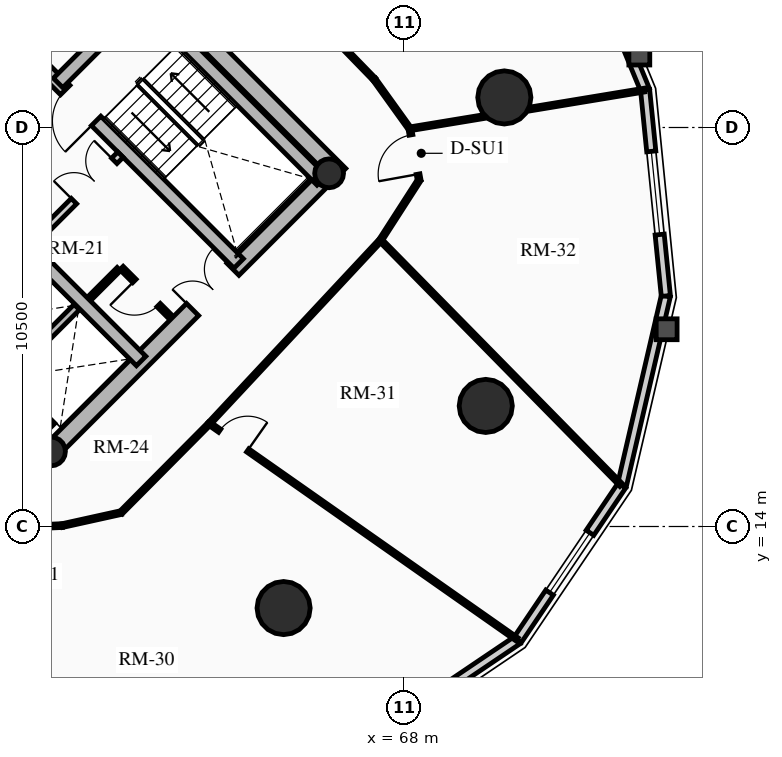
"""IFC4 building model, lengths in metres.
Left out: names, types, materials, properties, quantities, classifications, styles, units other than length and angle.
Written with IfcOpenShell. Run it as: python <this file> out.ifc"""

import sys

from ifc_helpers import new_model, si_unit, direction, frame, frame_2d, origin, origin_2d, place, context, subcontext, project, spatial, rectangle, circle, hollow_circle, extrude, source, transform, mapped, element, fill, save


model = new_model("IFC4")
c1 = context("Model", 3, precision=1e-05, world=origin(), true_north=direction((0.0, 1.0)))
c2 = subcontext(c1, "Body", "Model", "MODEL_VIEW")
j1 = project(units=[si_unit("LENGTHUNIT", "METRE"), si_unit("PLANEANGLEUNIT", "RADIAN")], contexts=[c1])
p1 = place(None, origin())
s1 = spatial("IfcSite", under=j1, at=p1, CompositionType="ELEMENT")
p2 = place(p1, origin())
s2 = spatial("IfcBuilding", under=s1, at=p2, CompositionType="ELEMENT")
p3 = place(p2, frame((0.0, 0.0, 99.25)))
s3 = spatial("IfcBuildingStorey", under=s2, at=p3, CompositionType="ELEMENT", Elevation=99.25)
for number, where, z_axis, x_axis in (
    (1, (58.737, 15.697, 0.0), (0.0, 0.0, 1.0), (-0.707, 0.707, 0.0)),
    (2, (66.303, 23.263, 0.0), (0.0, 0.0, 1.0), (-0.707, 0.707, 0.0)),
):
    element("IfcWall", number, at=place(p3, frame(where, z_axis=z_axis, x_axis=x_axis)), inside=s3, PredefinedType="SHEAR", context=c2, shape_type="SweptSolid", body=[
        extrude(rectangle(XDim=14.2, YDim=0.45, at=frame_2d((7.1, 0.0))), origin(), (0.0, 0.0, 1.0), 2.91),
    ])
p4 = place(p3, frame((58.578, 15.856, 0.0), z_axis=(0.0, 0.0, 1.0), x_axis=(0.707106781187, 0.707106781187, 0.0)))
e3 = element("IfcWall", 3, at=p4, inside=s3, PredefinedType="SHEAR", context=c2, shape_type="SweptSolid", body=[
    extrude(rectangle(XDim=10.7, YDim=0.45, at=frame_2d((5.35, 0.0))), origin(), (0.0, 0.0, 1.0), 2.91),
])
m1 = source(origin(), c2, "Body", "SweptSolid", [
    extrude(rectangle(XDim=1.5, YDim=2.02, at=frame_2d((0.75, 1.01))), frame((0.0, 0.235, 0.0), z_axis=(0.0, -1.0, 0.0), x_axis=(1.0, 0.0, 0.0)), (0.0, 0.0, 1.0), 0.47),
])
p5 = place(p4, frame((5.45, 0.0, 0.0)))
e4 = element("IfcOpeningElement", 4, at=p5, cuts=e3, PredefinedType="OPENING", context=c2, shape_type="MappedRepresentation", body=[
    mapped(m1, transform((0.0, 0.0, 0.0), x_axis=(1.0, 0.0, 0.0), y_axis=(0.0, 1.0, 0.0), z_axis=(0.0, 0.0, 1.0), scale=1.0)),
])
p6 = place(p3, frame((61.078, 18.355, 0.0), z_axis=(0.0, 0.0, 1.0), x_axis=(-0.707106781187, 0.707106781187, 0.0)))
e5 = element("IfcWall", 5, at=p6, inside=s3, PredefinedType="SHEAR", context=c2, shape_type="SweptSolid", body=[
    extrude(rectangle(XDim=13.75, YDim=0.35, at=frame_2d((6.875, 0.0))), origin(), (0.0, 0.0, 1.0), 2.91),
])
m2 = source(origin(), c2, "Body", "SweptSolid", [
    extrude(rectangle(XDim=1.1, YDim=2.015, at=frame_2d((0.55, 1.007))), frame((0.0, 0.185, 0.0), z_axis=(0.0, -1.0, 0.0), x_axis=(1.0, 0.0, 0.0)), (0.0, 0.0, 1.0), 0.37),
])
p7 = place(p6, frame((4.875, 0.0, 0.0)))
e6 = element("IfcOpeningElement", 6, at=p7, cuts=e5, PredefinedType="OPENING", context=c2, shape_type="MappedRepresentation", body=[
    mapped(m2, transform((0.0, 0.0, 0.0), x_axis=(1.0, 0.0, 0.0), y_axis=(0.0, 1.0, 0.0), z_axis=(0.0, 0.0, 1.0), scale=1.0)),
])
m3 = source(origin(), c2, "Body", "SweptSolid", [
    extrude(rectangle(XDim=1.15, YDim=2.02, at=frame_2d((0.575, 1.01))), frame((0.0, 0.185, 0.0), z_axis=(0.0, -1.0, 0.0), x_axis=(1.0, 0.0, 0.0)), (0.0, 0.0, 1.0), 0.37),
])
p8 = place(p6, frame((7.295, 0.0, 0.0)))
e7 = element("IfcOpeningElement", 7, at=p8, cuts=e5, PredefinedType="OPENING", context=c2, shape_type="MappedRepresentation", body=[
    mapped(m3, transform((0.0, 0.0, 0.0), x_axis=(1.0, 0.0, 0.0), y_axis=(0.0, 1.0, 0.0), z_axis=(0.0, 0.0, 1.0), scale=1.0)),
])
p9 = place(p3, frame((63.645, 20.922, 0.0), z_axis=(0.0, 0.0, 1.0), x_axis=(-0.707106781187, 0.707106781187, 0.0)))
e8 = element("IfcWall", 8, at=p9, inside=s3, PredefinedType="SHEAR", context=c2, shape_type="SweptSolid", body=[
    extrude(rectangle(XDim=13.75, YDim=0.35, at=frame_2d((6.875, 0.0))), origin(), (0.0, 0.0, 1.0), 2.91),
])
p10 = place(p9, frame((10.0, 0.0, 0.0)))
e9 = element("IfcOpeningElement", 9, at=p10, cuts=e8, PredefinedType="OPENING", context=c2, shape_type="MappedRepresentation", body=[
    mapped(m2, transform((0.0, 0.0, 0.0), x_axis=(1.0, 0.0, 0.0), y_axis=(0.0, 1.0, 0.0), z_axis=(0.0, 0.0, 1.0), scale=1.0)),
])
p11 = place(p9, frame((12.0, 0.0, 0.0)))
e10 = element("IfcOpeningElement", 10, at=p11, cuts=e8, PredefinedType="OPENING", context=c2, shape_type="MappedRepresentation", body=[
    mapped(m2, transform((0.0, 0.0, 0.0), x_axis=(1.0, 0.0, 0.0), y_axis=(0.0, 1.0, 0.0), z_axis=(0.0, 0.0, 1.0), scale=1.0)),
])
p12 = place(p9, frame((5.305, 0.0, 0.0)))
e11 = element("IfcOpeningElement", 11, at=p12, cuts=e8, PredefinedType="OPENING", context=c2, shape_type="MappedRepresentation", body=[
    mapped(m3, transform((0.0, 0.0, 0.0), x_axis=(1.0, 0.0, 0.0), y_axis=(0.0, 1.0, 0.0), z_axis=(0.0, 0.0, 1.0), scale=1.0)),
])
p13 = place(p3, frame((65.83, 23.107, 0.0), z_axis=(0.0, 0.0, 1.0), x_axis=(-0.707088616009, 0.707124945897, 0.0)))
e12 = element("IfcWall", 12, at=p13, inside=s3, PredefinedType="SHEAR", context=c2, shape_type="SweptSolid", body=[
    extrude(rectangle(XDim=6.72, YDim=0.35, at=frame_2d((3.36, 0.0))), origin(), (0.0, 0.0, 1.0), 2.91),
])
p14 = place(p3, frame((58.893, 25.674, 0.0), z_axis=(0.0, 0.0, 1.0), x_axis=(0.707106781187, 0.707106781187, 0.0)))
e13 = element("IfcWall", 13, at=p14, inside=s3, PredefinedType="SHEAR", context=c2, shape_type="SweptSolid", body=[
    extrude(rectangle(XDim=3.285, YDim=0.35, at=frame_2d((1.643, 0.0))), origin(), (0.0, 0.0, 1.0), 2.91),
])
for number, where, z_axis, x_axis in (
    (14, (58.706, 15.976, 0.0), (0.0, 0.0, 1.0), (0.707, 0.707, 0.0)),
    (15, (66.024, 23.294, 0.0), (0.0, 0.0, 1.0), (0.707, 0.707, 0.0)),
):
    element("IfcColumn", number, at=place(p3, frame(where, z_axis=z_axis, x_axis=x_axis)), inside=s3, PredefinedType="COLUMN", context=c2, shape_type="SweptSolid", body=[
        extrude(hollow_circle(Radius=0.38, WallThickness=0.032, at=origin_2d()), origin(), (0.0, 0.0, 1.0), 2.91),
    ])
for number, where, z_axis, x_axis in (
    (16, (64.827, 11.854, 0.0), (0.0, 0.0, 1.0), (1.0, 0.0, 0.0)),
    (17, (70.146, 17.173, 0.0), (0.0, 0.0, 1.0), (1.0, 0.0, 0.0)),
    (18, (70.635, 25.291, 0.0), (0.0, 0.0, 1.0), (1.0, 0.0, 0.0)),
):
    element("IfcColumn", number, at=place(p3, frame(where, z_axis=z_axis, x_axis=x_axis)), inside=s3, PredefinedType="USERDEFINED", context=c2, shape_type="SweptSolid", body=[
        extrude(circle(Radius=0.7, at=origin_2d()), origin(), (0.0, 0.0, 1.0), 2.91),
    ])
p15 = place(p3, frame((70.985, 11.015, 0.0), z_axis=(0.0, 0.0, 1.0), x_axis=(-0.828781148131, -0.559572880421, 0.0)))
e19 = element("IfcWall", 19, at=p15, inside=s3, PredefinedType="SOLIDWALL", context=c2, shape_type="SweptSolid", body=[
    extrude(rectangle(XDim=4.905, YDim=0.24, at=frame_2d((2.452, 0.0))), origin(), (0.0, 0.0, 1.0), 2.179),
])
p16 = place(p3, frame((73.729, 15.08, 0.0), z_axis=(0.0, 0.0, 1.0), x_axis=(-0.559572880421, -0.828781148131, 0.0)))
e20 = element("IfcWall", 20, at=p16, inside=s3, PredefinedType="SOLIDWALL", context=c2, shape_type="SweptSolid", body=[
    extrude(rectangle(XDim=4.905, YDim=0.24, at=frame_2d((2.452, 0.0))), origin(), (0.0, 0.0, 1.0), 2.179),
])
m4 = source(origin(), c2, "Body", "SweptSolid", [
    extrude(rectangle(XDim=1.9, YDim=1.35, at=frame_2d((0.95, 0.675))), frame((0.0, 0.13, 0.0), z_axis=(0.0, -1.0, 0.0), x_axis=(1.0, 0.0, 0.0)), (0.0, 0.0, 1.0), 0.26),
])
p17 = place(p16, frame((1.502, 0.0, 0.65)))
e21 = element("IfcOpeningElement", 21, at=p17, cuts=e20, PredefinedType="OPENING", context=c2, shape_type="MappedRepresentation", body=[
    mapped(m4, transform((0.0, 0.0, 0.0), x_axis=(1.0, 0.0, 0.0), y_axis=(0.0, 1.0, 0.0), z_axis=(0.0, 0.0, 1.0), scale=1.0)),
])
p18 = place(p3, frame((74.885, 20.067, 0.0), z_axis=(0.0, 0.0, 1.0), x_axis=(-0.225834725257, -0.974165631126, 0.0)))
e22 = element("IfcWall", 22, at=p18, inside=s3, PredefinedType="SOLIDWALL", context=c2, shape_type="SweptSolid", body=[
    extrude(rectangle(XDim=5.119, YDim=0.24, at=frame_2d((2.56, 0.0))), origin(), (0.0, 0.0, 1.0), 2.179),
])
p19 = place(p3, frame((74.339, 25.487, 0.0), z_axis=(0.0, 0.0, 1.0), x_axis=(0.10015591906, -0.994971754311, 0.0)))
e23 = element("IfcWall", 23, at=p19, inside=s3, PredefinedType="SOLIDWALL", context=c2, shape_type="SweptSolid", body=[
    extrude(rectangle(XDim=5.448, YDim=0.24, at=frame_2d((2.724, 0.0))), origin(), (0.0, 0.0, 1.0), 2.179),
])
m5 = source(origin(), c2, "Body", "SweptSolid", [
    extrude(rectangle(XDim=2.2, YDim=1.35, at=frame_2d((1.1, 0.675))), frame((0.0, 0.13, 0.0), z_axis=(0.0, -1.0, 0.0), x_axis=(1.0, 0.0, 0.0)), (0.0, 0.0, 1.0), 0.26),
])
p20 = place(p19, frame((1.624, 0.0, 0.65)))
e24 = element("IfcOpeningElement", 24, at=p20, cuts=e23, PredefinedType="OPENING", context=c2, shape_type="MappedRepresentation", body=[
    mapped(m5, transform((0.0, 0.0, 0.0), x_axis=(1.0, 0.0, 0.0), y_axis=(0.0, 1.0, 0.0), z_axis=(0.0, 0.0, 1.0), scale=1.0)),
])
p21 = place(p3, frame((72.145, 30.811, 0.0), z_axis=(0.0, 0.0, 1.0), x_axis=(0.381027003055, -0.924563909604, 0.0)))
e25 = element("IfcWall", 25, at=p21, inside=s3, PredefinedType="SOLIDWALL", context=c2, shape_type="SweptSolid", body=[
    extrude(rectangle(XDim=5.758, YDim=0.24, at=frame_2d((2.879, 0.0))), origin(), (0.0, 0.0, 1.0), 2.179),
])
p22 = place(p3, frame((57.284, 17.673, 0.0), z_axis=(0.0, 0.0, 1.0), x_axis=(0.707147878904, 0.70706568108, 0.0)))
e26 = element("IfcWall", 26, at=p22, inside=s3, PredefinedType="SHEAR", context=c2, shape_type="SweptSolid", body=[
    extrude(rectangle(XDim=2.97, YDim=0.2, at=frame_2d((1.485, 0.0))), origin(), (0.0, 0.0, 1.0), 2.91),
])
p23 = place(p3, frame((58.737, 16.644, 0.0), z_axis=(0.0, 0.0, 1.0), x_axis=(-0.707032117043, 0.707181437447, 0.0)))
e27 = element("IfcWall", 27, at=p23, inside=s3, PredefinedType="SHEAR", context=c2, shape_type="SweptSolid", body=[
    extrude(rectangle(XDim=1.635, YDim=0.2, at=frame_2d((0.817, 0.0))), origin(), (0.0, 0.0, 1.0), 2.91),
])
p24 = place(p3, frame((58.214, 21.467, 0.0), z_axis=(0.0, 0.0, 1.0), x_axis=(0.707106781187, 0.707106781187, 0.0)))
e28 = element("IfcWall", 28, at=p24, inside=s3, PredefinedType="PARTITIONING", context=c2, shape_type="SweptSolid", body=[
    extrude(rectangle(XDim=3.28, YDim=0.2, at=frame_2d((1.64, 0.0))), origin(), (0.0, 0.0, 1.0), 2.655),
])
m6 = source(origin(), c2, "Body", "SweptSolid", [
    extrude(rectangle(XDim=1.5, YDim=2.02, at=frame_2d((0.75, 1.01))), frame((0.0, 0.11, 0.0), z_axis=(0.0, -1.0, 0.0), x_axis=(1.0, 0.0, 0.0)), (0.0, 0.0, 1.0), 0.22),
])
p25 = place(p24, frame((1.55, 0.0, 0.0)))
e29 = element("IfcOpeningElement", 29, at=p25, cuts=e28, PredefinedType="OPENING", context=c2, shape_type="MappedRepresentation", body=[
    mapped(m6, transform((0.0, 0.0, 0.0), x_axis=(1.0, 0.0, 0.0), y_axis=(0.0, 1.0, 0.0), z_axis=(0.0, 0.0, 1.0), scale=1.0)),
])
p26 = place(p3, frame((61.835, 19.529, 0.0), z_axis=(0.0, 0.0, 1.0), x_axis=(-0.707174592913, 0.707038962956, 0.0)))
e30 = element("IfcWall", 30, at=p26, inside=s3, PredefinedType="PARTITIONING", context=c2, shape_type="SweptSolid", body=[
    extrude(rectangle(XDim=1.8, YDim=0.125, at=frame_2d((0.9, 0.0))), origin(), (0.0, 0.0, 1.0), 2.655),
])
m7 = source(origin(), c2, "Body", "SweptSolid", [
    extrude(rectangle(XDim=0.9, YDim=2.005, at=frame_2d((0.45, 1.002))), frame((0.0, 0.073, 0.0), z_axis=(0.0, -1.0, 0.0), x_axis=(1.0, 0.0, 0.0)), (0.0, 0.0, 1.0), 0.145),
])
p27 = place(p26, frame((0.42, 0.0, 0.0)))
e31 = element("IfcOpeningElement", 31, at=p27, cuts=e30, PredefinedType="OPENING", context=c2, shape_type="MappedRepresentation", body=[
    mapped(m7, transform((0.0, 0.0, 0.0), x_axis=(1.0, 0.0, 0.0), y_axis=(0.0, 1.0, 0.0), z_axis=(0.0, 0.0, 1.0), scale=1.0)),
])
p28 = place(p3, frame((59.713, 19.996, 0.0), z_axis=(0.0, 0.0, 1.0), x_axis=(0.707217726, 0.706995818963, 0.0)))
e32 = element("IfcWall", 32, at=p28, inside=s3, PredefinedType="PARTITIONING", context=c2, shape_type="SweptSolid", body=[
    extrude(rectangle(XDim=1.1, YDim=0.125, at=frame_2d((0.55, 0.0))), origin(), (0.0, 0.0, 1.0), 2.655),
])
p29 = place(p3, frame((57.516, 13.958, 0.0), z_axis=(0.0, 0.0, 1.0), x_axis=(0.999005711776, 0.044582371387, 0.0)))
e33 = element("IfcWall", 33, at=p29, inside=s3, PredefinedType="MOVABLE", context=c2, shape_type="SweptSolid", body=[
    extrude(rectangle(XDim=1.49, YDim=0.1, at=frame_2d((0.745, 0.0))), origin(), (0.0, 0.0, 1.0), 2.225),
])
m8 = source(origin(), c2, "Body", "SweptSolid", [
    extrude(rectangle(XDim=1.05, YDim=2.015, at=frame_2d((0.525, 1.007))), frame((0.0, 0.06, 0.0), z_axis=(0.0, -1.0, 0.0), x_axis=(1.0, 0.0, 0.0)), (0.0, 0.0, 1.0), 0.12),
])
p30 = place(p29, frame((0.12, 0.0, 0.0)))
e34 = element("IfcOpeningElement", 34, at=p30, cuts=e33, PredefinedType="OPENING", context=c2, shape_type="MappedRepresentation", body=[
    mapped(m8, transform((0.0, 0.0, 0.0), x_axis=(1.0, 0.0, 0.0), y_axis=(0.0, 1.0, 0.0), z_axis=(0.0, 0.0, 1.0), scale=1.0)),
])
p31 = place(p3, frame((59.004, 14.024, 0.0), z_axis=(0.0, 0.0, 1.0), x_axis=(0.976436847881, 0.215803341262, 0.0)))
e35 = element("IfcWall", 35, at=p31, inside=s3, PredefinedType="MOVABLE", context=c2, shape_type="SweptSolid", body=[
    extrude(rectangle(XDim=1.583, YDim=0.1, at=frame_2d((0.792, 0.0))), origin(), (0.0, 0.0, 1.0), 2.225),
])
p32 = place(p3, frame((60.549, 14.366, 0.0), z_axis=(0.0, 0.0, 1.0), x_axis=(0.704402344516, 0.709800913666, 0.0)))
e36 = element("IfcWall", 36, at=p32, inside=s3, PredefinedType="MOVABLE", context=c2, shape_type="SweptSolid", body=[
    extrude(rectangle(XDim=3.301, YDim=0.1, at=frame_2d((1.651, 0.0))), origin(), (0.0, 0.0, 1.0), 2.225),
])
p33 = place(p3, frame((62.875, 16.709, 0.0), z_axis=(0.0, 0.0, 1.0), x_axis=(0.682290572861, 0.731081099595, 0.0)))
e37 = element("IfcWall", 37, at=p33, inside=s3, PredefinedType="MOVABLE", context=c2, shape_type="SweptSolid", body=[
    extrude(rectangle(XDim=6.6, YDim=0.1, at=frame_2d((3.3, 0.0))), origin(), (0.0, 0.0, 1.0), 2.225),
])
p34 = place(p3, frame((67.378, 21.534, 0.0), z_axis=(0.0, 0.0, 1.0), x_axis=(0.54130306552, 0.840827563332, 0.0)))
e38 = element("IfcWall", 38, at=p34, inside=s3, PredefinedType="MOVABLE", context=c2, shape_type="SweptSolid", body=[
    extrude(rectangle(XDim=1.877, YDim=0.1, at=frame_2d((0.938, 0.0))), origin(), (0.0, 0.0, 1.0), 2.225),
])
p35 = place(p3, frame((68.394, 23.113, 0.0), z_axis=(0.0, 0.0, 1.0), x_axis=(-0.177868948753, 0.984054184011, 0.0)))
e39 = element("IfcWall", 39, at=p35, inside=s3, PredefinedType="MOVABLE", context=c2, shape_type="SweptSolid", body=[
    extrude(rectangle(XDim=1.374, YDim=0.1, at=frame_2d((0.687, 0.0))), origin(), (0.0, 0.0, 1.0), 2.225),
])
p36 = place(p35, frame((0.162, 0.0, 0.0)))
e40 = element("IfcOpeningElement", 40, at=p36, cuts=e39, PredefinedType="OPENING", context=c2, shape_type="MappedRepresentation", body=[
    mapped(m8, transform((0.0, 0.0, 0.0), x_axis=(1.0, 0.0, 0.0), y_axis=(0.0, 1.0, 0.0), z_axis=(0.0, 0.0, 1.0), scale=1.0)),
])
p37 = place(p3, frame((68.15, 24.465, 0.0), z_axis=(0.0, 0.0, 1.0), x_axis=(-0.58376767291, 0.811920749868, 0.0)))
e41 = element("IfcWall", 41, at=p37, inside=s3, PredefinedType="MOVABLE", context=c2, shape_type="SweptSolid", body=[
    extrude(rectangle(XDim=1.605, YDim=0.1, at=frame_2d((0.803, 0.0))), origin(), (0.0, 0.0, 1.0), 2.225),
])
p38 = place(p3, frame((67.213, 25.768, 0.0), z_axis=(0.0, 0.0, 1.0), x_axis=(-0.696916079748, 0.717152687918, 0.0)))
e42 = element("IfcWall", 42, at=p38, inside=s3, PredefinedType="MOVABLE", context=c2, shape_type="SweptSolid", body=[
    extrude(rectangle(XDim=5.972, YDim=0.1, at=frame_2d((2.986, 0.0))), origin(), (0.0, 0.0, 1.0), 2.655),
])
m9 = source(origin(), c2, "Body", "SweptSolid", [
    extrude(rectangle(XDim=1.0, YDim=2.015, at=frame_2d((0.5, 1.007))), frame((0.0, 0.06, 0.0), z_axis=(0.0, -1.0, 0.0), x_axis=(1.0, 0.0, 0.0)), (0.0, 0.0, 1.0), 0.12),
])
p39 = place(p38, frame((2.486, 0.0, 0.0)))
e43 = element("IfcOpeningElement", 43, at=p39, cuts=e42, PredefinedType="OPENING", context=c2, shape_type="MappedRepresentation", body=[
    mapped(m9, transform((0.0, 0.0, 0.0), x_axis=(1.0, 0.0, 0.0), y_axis=(0.0, 1.0, 0.0), z_axis=(0.0, 0.0, 1.0), scale=1.0)),
])
p40 = place(p3, frame((67.378, 21.534, 0.0), z_axis=(0.0, 0.0, 1.0), x_axis=(0.700878918497, -0.713280268622, 0.0)))
e44 = element("IfcWall", 44, at=p40, inside=s3, PredefinedType="MOVABLE", context=c2, shape_type="SweptSolid", body=[
    extrude(rectangle(XDim=9.036, YDim=0.1, at=frame_2d((4.518, 0.0))), origin(), (0.0, 0.0, 1.0), 2.179),
])
p41 = place(p3, frame((68.15, 24.465, 0.0), z_axis=(0.0, 0.0, 1.0), x_axis=(0.986627164528, 0.162993368625, 0.0)))
e45 = element("IfcWall", 45, at=p41, inside=s3, PredefinedType="MOVABLE", context=c2, shape_type="SweptSolid", body=[
    extrude(rectangle(XDim=6.254, YDim=0.1, at=frame_2d((3.127, 0.0))), origin(), (0.0, 0.0, 1.0), 2.179),
])
p42 = place(p3, frame((62.875, 16.709, 0.0), z_axis=(0.0, 0.0, 1.0), x_axis=(0.818628370173, -0.574323594804, 0.0)))
e46 = element("IfcWall", 46, at=p42, inside=s3, PredefinedType="MOVABLE", context=c2, shape_type="SweptSolid", body=[
    extrude(rectangle(XDim=9.889, YDim=0.1, at=frame_2d((4.945, 0.0))), origin(), (0.0, 0.0, 1.0), 2.179),
])
m10 = source(origin(), c2, "Body", "SweptSolid", [
    extrude(rectangle(XDim=0.9, YDim=2.005, at=frame_2d((0.45, 1.002))), frame((0.0, 0.06, 0.0), z_axis=(0.0, -1.0, 0.0), x_axis=(1.0, 0.0, 0.0)), (0.0, 0.0, 1.0), 0.12),
])
p43 = place(p42, frame((0.33, 0.0, 0.0)))
e47 = element("IfcOpeningElement", 47, at=p43, cuts=e46, PredefinedType="OPENING", context=c2, shape_type="MappedRepresentation", body=[
    mapped(m10, transform((0.0, 0.0, 0.0), x_axis=(1.0, 0.0, 0.0), y_axis=(0.0, 1.0, 0.0), z_axis=(0.0, 0.0, 1.0), scale=1.0)),
])
m11 = source(origin(), c2, "Body", "SweptSolid", [
    extrude(rectangle(XDim=1.9, YDim=1.35, at=frame_2d((0.95, 0.675))), frame((0.0, 0.03, 0.0), z_axis=(0.0, -1.0, 0.0), x_axis=(1.0, 0.0, 0.0)), (0.0, 0.0, 1.0), 0.06),
])
p44 = place(p17, origin())
e48 = element("IfcWindow", 48, at=p44, inside=s3, PartitioningType="DOUBLE_PANEL_VERTICAL", PredefinedType="WINDOW", context=c2, shape_type="MappedRepresentation", body=[
    mapped(m11, transform((0.0, 0.0, 0.0), x_axis=(1.0, 0.0, 0.0), y_axis=(0.0, 1.0, 0.0), z_axis=(0.0, 0.0, 1.0), scale=1.0)),
])
fill(e21, e48)
m12 = source(origin(), c2, "Body", "SweptSolid", [
    extrude(rectangle(XDim=2.2, YDim=1.35, at=frame_2d((1.1, 0.675))), frame((0.0, 0.03, 0.0), z_axis=(0.0, -1.0, 0.0), x_axis=(1.0, 0.0, 0.0)), (0.0, 0.0, 1.0), 0.06),
])
p45 = place(p20, origin())
e49 = element("IfcWindow", 49, at=p45, inside=s3, PartitioningType="DOUBLE_PANEL_VERTICAL", PredefinedType="WINDOW", context=c2, shape_type="MappedRepresentation", body=[
    mapped(m12, transform((0.0, 0.0, 0.0), x_axis=(1.0, 0.0, 0.0), y_axis=(0.0, 1.0, 0.0), z_axis=(0.0, 0.0, 1.0), scale=1.0)),
])
fill(e24, e49)
m13 = source(origin(), c2, "Body", "SweptSolid", [
    extrude(rectangle(XDim=1.15, YDim=2.02, at=frame_2d((0.575, 1.01))), frame((0.0, 0.025, 0.0), z_axis=(0.0, -1.0, 0.0), x_axis=(1.0, 0.0, 0.0)), (0.0, 0.0, 1.0), 0.05),
])
p46 = place(p12, origin())
e50 = element("IfcDoor", 50, at=p46, inside=s3, OperationType="SINGLE_SWING_LEFT", PredefinedType="DOOR", context=c2, shape_type="MappedRepresentation", body=[
    mapped(m13, transform((0.0, 0.0, 0.0), x_axis=(1.0, 0.0, 0.0), y_axis=(0.0, 1.0, 0.0), z_axis=(0.0, 0.0, 1.0), scale=1.0)),
])
fill(e11, e50)
m14 = source(origin(), c2, "Body", "SweptSolid", [
    extrude(rectangle(XDim=1.5, YDim=2.02, at=frame_2d((0.75, 1.01))), frame((0.0, 0.025, 0.0), z_axis=(0.0, -1.0, 0.0), x_axis=(1.0, 0.0, 0.0)), (0.0, 0.0, 1.0), 0.05),
])
p47 = place(p5, origin())
e51 = element("IfcDoor", 51, at=p47, inside=s3, OperationType="DOUBLE_DOOR_SINGLE_SWING", PredefinedType="DOOR", context=c2, shape_type="MappedRepresentation", body=[
    mapped(m14, transform((0.0, 0.0, 0.0), x_axis=(1.0, 0.0, 0.0), y_axis=(0.0, 1.0, 0.0), z_axis=(0.0, 0.0, 1.0), scale=1.0)),
])
fill(e4, e51)
p48 = place(p25, origin())
e52 = element("IfcDoor", 52, at=p48, inside=s3, OperationType="DOUBLE_DOOR_SINGLE_SWING", PredefinedType="DOOR", context=c2, shape_type="MappedRepresentation", body=[
    mapped(m14, transform((0.0, 0.0, 0.0), x_axis=(1.0, 0.0, 0.0), y_axis=(0.0, 1.0, 0.0), z_axis=(0.0, 0.0, 1.0), scale=1.0)),
])
fill(e29, e52)
m15 = source(origin(), c2, "Body", "SweptSolid", [
    extrude(rectangle(XDim=0.9, YDim=2.005, at=frame_2d((0.45, 1.002))), frame((0.0, 0.025, 0.0), z_axis=(0.0, -1.0, 0.0), x_axis=(1.0, 0.0, 0.0)), (0.0, 0.0, 1.0), 0.05),
])
p49 = place(p27, origin())
e53 = element("IfcDoor", 53, at=p49, inside=s3, OperationType="SINGLE_SWING_RIGHT", PredefinedType="DOOR", context=c2, shape_type="MappedRepresentation", body=[
    mapped(m15, transform((0.0, 0.0, 0.0), x_axis=(1.0, 0.0, 0.0), y_axis=(0.0, 1.0, 0.0), z_axis=(0.0, 0.0, 1.0), scale=1.0)),
])
fill(e31, e53)
p50 = place(p43, origin())
e54 = element("IfcDoor", 54, at=p50, inside=s3, OperationType="SINGLE_SWING_RIGHT", PredefinedType="DOOR", context=c2, shape_type="MappedRepresentation", body=[
    mapped(m15, transform((0.0, 0.0, 0.0), x_axis=(1.0, 0.0, 0.0), y_axis=(0.0, 1.0, 0.0), z_axis=(0.0, 0.0, 1.0), scale=1.0)),
])
fill(e47, e54)
m16 = source(origin(), c2, "Body", "SweptSolid", [
    extrude(rectangle(XDim=1.05, YDim=2.015, at=frame_2d((0.525, 1.007))), frame((0.0, 0.025, 0.0), z_axis=(0.0, -1.0, 0.0), x_axis=(1.0, 0.0, 0.0)), (0.0, 0.0, 1.0), 0.05),
])
p51 = place(p36, origin())
e55 = element("IfcDoor", 55, at=p51, inside=s3, OperationType="SINGLE_SWING_LEFT", PredefinedType="DOOR", context=c2, shape_type="MappedRepresentation", body=[
    mapped(m16, transform((0.0, 0.0, 0.0), x_axis=(1.0, 0.0, 0.0), y_axis=(0.0, 1.0, 0.0), z_axis=(0.0, 0.0, 1.0), scale=1.0)),
])
fill(e40, e55)
save(model, sys.argv[1])
